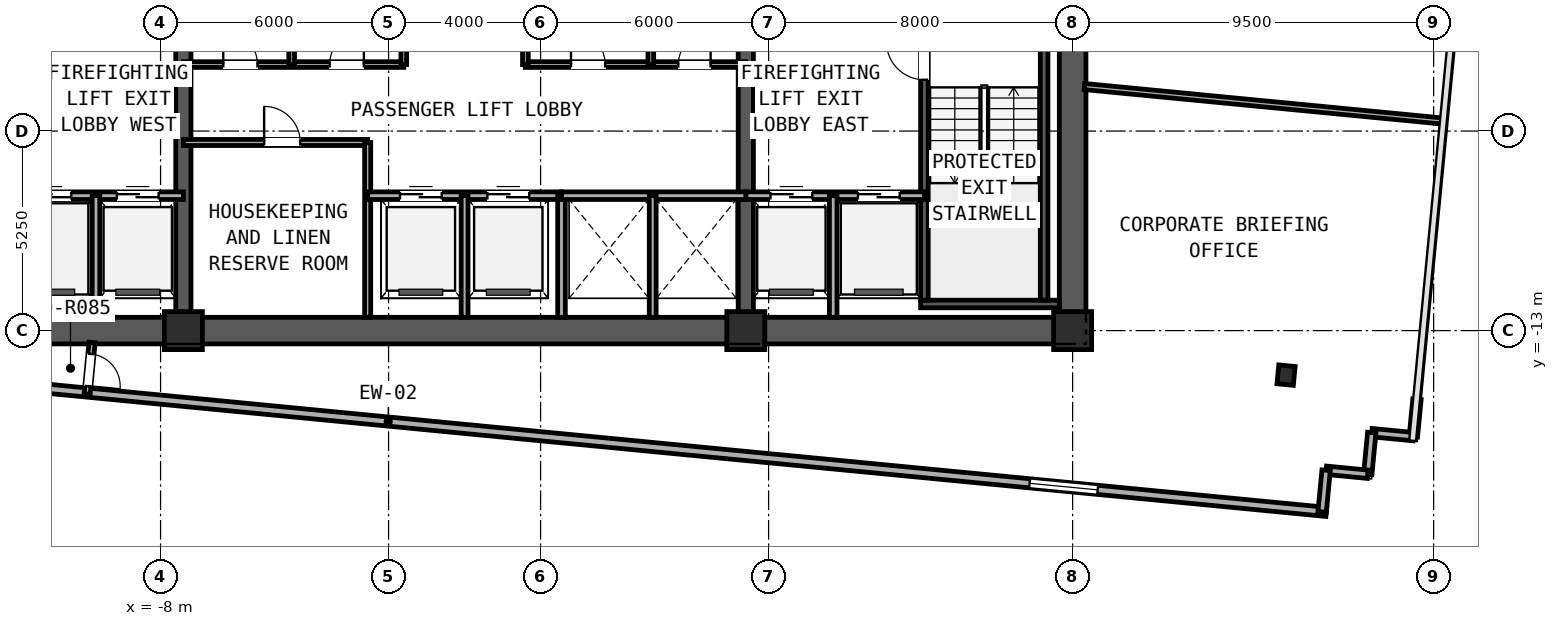
"""IFC4 building model, lengths in metres.
Left out: names, types, materials, properties, quantities, classifications, styles, units other than length and angle.
Written with IfcOpenShell. Run it as: python <this file> out.ifc"""

import sys

from ifc_helpers import new_model, si_unit, direction, frame, frame_2d, origin, origin_2d, place, context, subcontext, project, spatial, rectangle, i_section, extrude, element, fill, save


model = new_model("IFC4")
c1 = context("Model", 3, precision=1e-05, world=origin(), true_north=direction((0.0, 1.0)))
c2 = subcontext(c1, "Body", "Model", "MODEL_VIEW")
j1 = project(units=[si_unit("LENGTHUNIT", "METRE"), si_unit("PLANEANGLEUNIT", "RADIAN")], contexts=[c1])
p1 = place(None, origin())
s1 = spatial("IfcSite", under=j1, at=p1, CompositionType="ELEMENT")
p2 = place(p1, origin())
s2 = spatial("IfcBuilding", under=s1, at=p2, CompositionType="ELEMENT")
p3 = place(p2, frame((0.0, 0.0, 160.05)))
s3 = spatial("IfcBuildingStorey", under=s2, at=p3, CompositionType="ELEMENT", Elevation=160.05)
p4 = place(p3, frame((-16.35, -13.0, 0.0), z_axis=(0.0, 0.0, 1.0), x_axis=(1.0, 0.0, 0.0)))
e1 = element("IfcWall", 1, at=p4, inside=s3, PredefinedType="SHEAR", context=c2, shape_type="SweptSolid", body=[
    extrude(rectangle(XDim=32.7, YDim=0.7, at=frame_2d((16.35, 0.0))), origin(), (0.0, 0.0, 1.0), 2.91),
])
p5 = place(p3, frame((16.0, -12.65, 0.0), z_axis=(0.0, 0.0, 1.0), x_axis=(0.0, 1.0, 0.0)))
e2 = element("IfcWall", 2, at=p5, inside=s3, PredefinedType="SHEAR", context=c2, shape_type="SweptSolid", body=[
    extrude(rectangle(XDim=9.8, YDim=0.7, at=frame_2d((4.9, 0.0))), origin(), (0.0, 0.0, 1.0), 2.91),
])
for number, where, z_axis, x_axis in (
    (3, (-7.4, -12.65, 0.0), (0.0, 0.0, 1.0), (0.0, 1.0, 0.0)),
    (4, (7.4, -12.65, 0.0), (0.0, 0.0, 1.0), (0.0, 1.0, 0.0)),
):
    element("IfcWall", number, at=place(p3, frame(where, z_axis=z_axis, x_axis=x_axis)), inside=s3, PredefinedType="SHEAR", context=c2, shape_type="SweptSolid", body=[
        extrude(rectangle(XDim=9.8, YDim=0.4, at=frame_2d((4.9, 0.0))), origin(), (0.0, 0.0, 1.0), 3.19),
    ])
p6 = place(p3, frame((12.0, -12.3, 0.0), z_axis=(0.0, 0.0, 1.0), x_axis=(1.0, 0.0, 0.0)))
e5 = element("IfcWall", 5, at=p6, inside=s3, PredefinedType="SOLIDWALL", context=c2, shape_type="SweptSolid", body=[
    extrude(rectangle(XDim=3.65, YDim=0.2, at=frame_2d((1.825, 0.0))), origin(), (0.0, 0.0, 1.0), 3.19),
])
p7 = place(p3, frame((12.1, -12.2, 0.0), z_axis=(0.0, 0.0, 1.0), x_axis=(0.0, 1.0, 0.0)))
e6 = element("IfcWall", 6, at=p7, inside=s3, PredefinedType="SOLIDWALL", context=c2, shape_type="SweptSolid", body=[
    extrude(rectangle(XDim=7.0, YDim=0.2, at=frame_2d((3.5, 0.0))), origin(), (0.0, 0.0, 1.0), 3.19),
])
p8 = place(p7, frame((5.8, 0.0, 0.0)))
e7 = element("IfcOpeningElement", 7, at=p8, cuts=e6, PredefinedType="OPENING", context=c2, shape_type="SweptSolid", body=[
    extrude(rectangle(XDim=1.0, YDim=2.1, at=frame_2d((0.5, 1.05))), frame((0.0, 0.11, 0.0), z_axis=(0.0, -1.0, 0.0), x_axis=(1.0, 0.0, 0.0)), (0.0, 0.0, 1.0), 0.22),
])
p9 = place(p3, frame((15.25, -12.2, 0.0), z_axis=(0.0, 0.0, 1.0), x_axis=(0.0, 1.0, 0.0)))
e8 = element("IfcWall", 8, at=p9, inside=s3, PredefinedType="SOLIDWALL", context=c2, shape_type="SweptSolid", body=[
    extrude(rectangle(XDim=7.0, YDim=0.2, at=frame_2d((3.5, 0.0))), origin(), (0.0, 0.0, 1.0), 3.19),
])
for number, where, z_axis, x_axis in (
    (9, (-7.4, -13.0, 0.0), (0.0, 0.0, 1.0), (1.0, 0.0, 0.0)),
    (10, (7.4, -13.0, 0.0), (0.0, 0.0, 1.0), (1.0, 0.0, 0.0)),
    (11, (16.0, -13.0, 0.0), (0.0, 0.0, 1.0), (1.0, 0.0, 0.0)),
):
    element("IfcColumn", number, at=place(p3, frame(where, z_axis=z_axis, x_axis=x_axis)), inside=s3, PredefinedType="COLUMN", context=c2, shape_type="SweptSolid", body=[
        extrude(rectangle(XDim=1.0, YDim=1.0, at=origin_2d()), origin(), (0.0, 0.0, 1.0), 3.45),
    ])
p10 = place(p3, frame((21.616, -14.172, 0.0), z_axis=(0.0, 0.0, 1.0), x_axis=(0.995396198367, -0.09584575252, 0.0)))
e12 = element("IfcColumn", 12, at=p10, inside=s3, PredefinedType="COLUMN", context=c2, shape_type="SweptSolid", body=[
    extrude(i_section(OverallWidth=0.432, OverallDepth=0.498, WebThickness=0.056, FlangeThickness=0.089, FilletRadius=0.031, at=origin_2d()), origin(), (0.0, 0.0, 1.0), 3.45),
])
p11 = place(p3, frame((-26.695, -13.016, 0.0), z_axis=(0.0, 0.0, 1.0), x_axis=(0.995396268366, -0.095845025554, 0.0)))
e13 = element("IfcWall", 13, at=p11, inside=s3, PredefinedType="STANDARD", context=c2, shape_type="SweptSolid", body=[
    extrude(rectangle(XDim=49.6, YDim=0.24, at=frame_2d((24.8, 0.0))), origin(), (0.0, 0.0, 1.0), 3.19),
])
p12 = place(p11, frame((6.044, 0.0, 0.7)))
e14 = element("IfcOpeningElement", 14, at=p12, cuts=e13, PredefinedType="OPENING", context=c2, shape_type="SweptSolid", body=[
    extrude(rectangle(XDim=1.8, YDim=1.5, at=frame_2d((0.9, 0.75))), frame((0.0, 0.13, 0.0), z_axis=(0.0, -1.0, 0.0), x_axis=(1.0, 0.0, 0.0)), (0.0, 0.0, 1.0), 0.26),
])
p13 = place(p11, frame((41.756, 0.0, 0.7)))
e15 = element("IfcOpeningElement", 15, at=p13, cuts=e13, PredefinedType="OPENING", context=c2, shape_type="SweptSolid", body=[
    extrude(rectangle(XDim=1.8, YDim=1.5, at=frame_2d((0.9, 0.75))), frame((0.0, 0.13, 0.0), z_axis=(0.0, -1.0, 0.0), x_axis=(1.0, 0.0, 0.0)), (0.0, 0.0, 1.0), 0.26),
])
p14 = place(p3, frame((25.062, -14.805, 0.0), z_axis=(0.0, 0.0, 1.0), x_axis=(-0.095914428506, -0.995389583231, 0.0)))
e16 = element("IfcWall", 16, at=p14, inside=s3, PredefinedType="STANDARD", context=c2, shape_type="SweptSolid", body=[
    extrude(rectangle(XDim=0.99, YDim=0.22, at=frame_2d((0.495, 0.0))), origin(), (0.0, 0.0, 1.0), 3.19),
])
for number, where, z_axis, x_axis in (
    (17, (24.967, -15.791, 0.0), (0.0, 0.0, 1.0), (-0.995, 0.096, 0.0)),
    (18, (23.872, -15.685, 0.0), (0.0, 0.0, 1.0), (-0.096, -0.995, 0.0)),
    (19, (23.766, -16.78, 0.0), (0.0, 0.0, 1.0), (-0.995, 0.096, 0.0)),
    (20, (22.671, -16.675, 0.0), (0.0, 0.0, 1.0), (-0.096, -0.995, 0.0)),
):
    element("IfcWall", number, at=place(p3, frame(where, z_axis=z_axis, x_axis=x_axis)), inside=s3, PredefinedType="STANDARD", context=c2, shape_type="SweptSolid", body=[
        extrude(rectangle(XDim=1.1, YDim=0.22, at=frame_2d((0.55, 0.0))), origin(), (0.0, 0.0, 1.0), 3.19),
    ])
p15 = place(p3, frame((-12.1, -9.45, 0.0), z_axis=(0.0, 0.0, 1.0), x_axis=(1.0, 0.0, 0.0)))
e21 = element("IfcWall", 21, at=p15, inside=s3, PredefinedType="PARTITIONING", context=c2, shape_type="SweptSolid", body=[
    extrude(rectangle(XDim=4.7, YDim=0.2, at=frame_2d((2.35, 0.0))), origin(), (0.0, 0.0, 1.0), 3.19),
])
p16 = place(p15, frame((0.65, 0.0, 0.0)))
e22 = element("IfcOpeningElement", 22, at=p16, cuts=e21, PredefinedType="OPENING", context=c2, shape_type="SweptSolid", body=[
    extrude(rectangle(XDim=1.1, YDim=2.2, at=frame_2d((0.55, 1.1))), frame((0.0, 0.11, 0.0), z_axis=(0.0, -1.0, 0.0), x_axis=(1.0, 0.0, 0.0)), (0.0, 0.0, 1.0), 0.22),
])
p17 = place(p15, frame((2.95, 0.0, 0.0)))
e23 = element("IfcOpeningElement", 23, at=p17, cuts=e21, PredefinedType="OPENING", context=c2, shape_type="SweptSolid", body=[
    extrude(rectangle(XDim=1.1, YDim=2.2, at=frame_2d((0.55, 1.1))), frame((0.0, 0.11, 0.0), z_axis=(0.0, -1.0, 0.0), x_axis=(1.0, 0.0, 0.0)), (0.0, 0.0, 1.0), 0.22),
])
p18 = place(p3, frame((-9.7, -12.65, 0.0), z_axis=(0.0, 0.0, 1.0), x_axis=(0.0, 1.0, 0.0)))
e24 = element("IfcWall", 24, at=p18, inside=s3, PredefinedType="PARTITIONING", context=c2, shape_type="SweptSolid", body=[
    extrude(rectangle(XDim=3.2, YDim=0.2, at=frame_2d((1.6, 0.0))), origin(), (0.0, 0.0, 1.0), 2.225),
])
p19 = place(p3, frame((7.4, -9.45, 0.0), z_axis=(0.0, 0.0, 1.0), x_axis=(1.0, 0.0, 0.0)))
e25 = element("IfcWall", 25, at=p19, inside=s3, PredefinedType="PARTITIONING", context=c2, shape_type="SweptSolid", body=[
    extrude(rectangle(XDim=4.7, YDim=0.2, at=frame_2d((2.35, 0.0))), origin(), (0.0, 0.0, 1.0), 3.19),
])
p20 = place(p19, frame((2.95, 0.0, 0.0)))
e26 = element("IfcOpeningElement", 26, at=p20, cuts=e25, PredefinedType="OPENING", context=c2, shape_type="SweptSolid", body=[
    extrude(rectangle(XDim=1.1, YDim=2.2, at=frame_2d((0.55, 1.1))), frame((0.0, 0.11, 0.0), z_axis=(0.0, -1.0, 0.0), x_axis=(1.0, 0.0, 0.0)), (0.0, 0.0, 1.0), 0.22),
])
p21 = place(p19, frame((0.65, 0.0, 0.0)))
e27 = element("IfcOpeningElement", 27, at=p21, cuts=e25, PredefinedType="OPENING", context=c2, shape_type="SweptSolid", body=[
    extrude(rectangle(XDim=1.1, YDim=2.2, at=frame_2d((0.55, 1.1))), frame((0.0, 0.11, 0.0), z_axis=(0.0, -1.0, 0.0), x_axis=(1.0, 0.0, 0.0)), (0.0, 0.0, 1.0), 0.22),
])
p22 = place(p3, frame((9.7, -12.65, 0.0), z_axis=(0.0, 0.0, 1.0), x_axis=(0.0, 1.0, 0.0)))
e28 = element("IfcWall", 28, at=p22, inside=s3, PredefinedType="PARTITIONING", context=c2, shape_type="SweptSolid", body=[
    extrude(rectangle(XDim=3.2, YDim=0.2, at=frame_2d((1.6, 0.0))), origin(), (0.0, 0.0, 1.0), 2.225),
])
p23 = place(p3, frame((-7.4, -8.05, 0.0), z_axis=(0.0, 0.0, 1.0), x_axis=(1.0, 0.0, 0.0)))
e29 = element("IfcWall", 29, at=p23, inside=s3, PredefinedType="PARTITIONING", context=c2, shape_type="SweptSolid", body=[
    extrude(rectangle(XDim=4.85, YDim=0.16, at=frame_2d((2.425, 0.0))), origin(), (0.0, 0.0, 1.0), 3.19),
])
p24 = place(p23, frame((2.125, 0.0, 0.0)))
e30 = element("IfcOpeningElement", 30, at=p24, cuts=e29, PredefinedType="OPENING", context=c2, shape_type="SweptSolid", body=[
    extrude(rectangle(XDim=0.95, YDim=2.15, at=frame_2d((0.475, 1.075))), frame((0.0, 0.09, 0.0), z_axis=(0.0, -1.0, 0.0), x_axis=(1.0, 0.0, 0.0)), (0.0, 0.0, 1.0), 0.18),
])
p25 = place(p3, frame((-2.55, -12.65, 0.0), z_axis=(0.0, 0.0, 1.0), x_axis=(0.0, 1.0, 0.0)))
e31 = element("IfcWall", 31, at=p25, inside=s3, PredefinedType="PARTITIONING", context=c2, shape_type="SweptSolid", body=[
    extrude(rectangle(XDim=4.6, YDim=0.16, at=frame_2d((2.3, 0.0))), origin(), (0.0, 0.0, 1.0), 2.225),
])
p26 = place(p3, frame((-2.55, -9.45, 0.0), z_axis=(0.0, 0.0, 1.0), x_axis=(1.0, 0.0, 0.0)))
e32 = element("IfcWall", 32, at=p26, inside=s3, PredefinedType="PARTITIONING", context=c2, shape_type="SweptSolid", body=[
    extrude(rectangle(XDim=5.1, YDim=0.2, at=frame_2d((2.55, 0.0))), origin(), (0.0, 0.0, 1.0), 3.19),
])
p27 = place(p26, frame((0.85, 0.0, 0.0)))
e33 = element("IfcOpeningElement", 33, at=p27, cuts=e32, PredefinedType="OPENING", context=c2, shape_type="SweptSolid", body=[
    extrude(rectangle(XDim=1.1, YDim=2.2, at=frame_2d((0.55, 1.1))), frame((0.0, 0.11, 0.0), z_axis=(0.0, -1.0, 0.0), x_axis=(1.0, 0.0, 0.0)), (0.0, 0.0, 1.0), 0.22),
])
p28 = place(p26, frame((3.15, 0.0, 0.0)))
e34 = element("IfcOpeningElement", 34, at=p28, cuts=e32, PredefinedType="OPENING", context=c2, shape_type="SweptSolid", body=[
    extrude(rectangle(XDim=1.1, YDim=2.2, at=frame_2d((0.55, 1.1))), frame((0.0, 0.11, 0.0), z_axis=(0.0, -1.0, 0.0), x_axis=(1.0, 0.0, 0.0)), (0.0, 0.0, 1.0), 0.22),
])
p29 = place(p3, frame((0.0, -12.65, 0.0), z_axis=(0.0, 0.0, 1.0), x_axis=(0.0, 1.0, 0.0)))
e35 = element("IfcWall", 35, at=p29, inside=s3, PredefinedType="PARTITIONING", context=c2, shape_type="SweptSolid", body=[
    extrude(rectangle(XDim=3.2, YDim=0.18, at=frame_2d((1.6, 0.0))), origin(), (0.0, 0.0, 1.0), 2.225),
])
p30 = place(p3, frame((2.55, -12.65, 0.0), z_axis=(0.0, 0.0, 1.0), x_axis=(0.0, 1.0, 0.0)))
e36 = element("IfcWall", 36, at=p30, inside=s3, PredefinedType="PARTITIONING", context=c2, shape_type="SweptSolid", body=[
    extrude(rectangle(XDim=3.2, YDim=0.2, at=frame_2d((1.6, 0.0))), origin(), (0.0, 0.0, 1.0), 2.225),
])
p31 = place(p3, frame((2.55, -9.45, 0.0), z_axis=(0.0, 0.0, 1.0), x_axis=(1.0, 0.0, 0.0)))
e37 = element("IfcWall", 37, at=p31, inside=s3, PredefinedType="PARTITIONING", context=c2, shape_type="SweptSolid", body=[
    extrude(rectangle(XDim=4.85, YDim=0.2, at=frame_2d((2.425, 0.0))), origin(), (0.0, 0.0, 1.0), 3.19),
])
p32 = place(p3, frame((4.95, -12.65, 0.0), z_axis=(0.0, 0.0, 1.0), x_axis=(0.0, 1.0, 0.0)))
e38 = element("IfcWall", 38, at=p32, inside=s3, PredefinedType="PARTITIONING", context=c2, shape_type="SweptSolid", body=[
    extrude(rectangle(XDim=3.2, YDim=0.18, at=frame_2d((1.6, 0.0))), origin(), (0.0, 0.0, 1.0), 2.225),
])
p33 = place(p3, frame((-7.4, -6.0, 0.0), z_axis=(0.0, 0.0, 1.0), x_axis=(1.0, 0.0, 0.0)))
e39 = element("IfcWall", 39, at=p33, inside=s3, PredefinedType="PARTITIONING", context=c2, shape_type="SweptSolid", body=[
    extrude(rectangle(XDim=5.8, YDim=0.15, at=frame_2d((2.9, 0.0))), origin(), (0.0, 0.0, 1.0), 3.19),
])
p34 = place(p33, frame((1.05, 0.0, 0.0)))
e40 = element("IfcOpeningElement", 40, at=p34, cuts=e39, PredefinedType="OPENING", context=c2, shape_type="SweptSolid", body=[
    extrude(rectangle(XDim=0.9, YDim=2.1, at=frame_2d((0.45, 1.05))), frame((0.0, 0.085, 0.0), z_axis=(0.0, -1.0, 0.0), x_axis=(1.0, 0.0, 0.0)), (0.0, 0.0, 1.0), 0.17),
])
p35 = place(p33, frame((3.85, 0.0, 0.0)))
e41 = element("IfcOpeningElement", 41, at=p35, cuts=e39, PredefinedType="OPENING", context=c2, shape_type="SweptSolid", body=[
    extrude(rectangle(XDim=0.9, YDim=2.1, at=frame_2d((0.45, 1.05))), frame((0.0, 0.085, 0.0), z_axis=(0.0, -1.0, 0.0), x_axis=(1.0, 0.0, 0.0)), (0.0, 0.0, 1.0), 0.17),
])
p36 = place(p3, frame((-1.6, -6.0, 0.0), z_axis=(0.0, 0.0, 1.0), x_axis=(0.0, 1.0, 0.0)))
e42 = element("IfcWall", 42, at=p36, inside=s3, PredefinedType="PARTITIONING", context=c2, shape_type="SweptSolid", body=[
    extrude(rectangle(XDim=3.5, YDim=0.15, at=frame_2d((1.75, 0.0))), origin(), (0.0, 0.0, 1.0), 2.225),
])
p37 = place(p3, frame((1.6, -6.0, 0.0), z_axis=(0.0, 0.0, 1.0), x_axis=(1.0, 0.0, 0.0)))
e43 = element("IfcWall", 43, at=p37, inside=s3, PredefinedType="PARTITIONING", context=c2, shape_type="SweptSolid", body=[
    extrude(rectangle(XDim=5.8, YDim=0.15, at=frame_2d((2.9, 0.0))), origin(), (0.0, 0.0, 1.0), 3.19),
])
p38 = place(p37, frame((1.2, 0.0, 0.0)))
e44 = element("IfcOpeningElement", 44, at=p38, cuts=e43, PredefinedType="OPENING", context=c2, shape_type="SweptSolid", body=[
    extrude(rectangle(XDim=0.9, YDim=2.1, at=frame_2d((0.45, 1.05))), frame((0.0, 0.085, 0.0), z_axis=(0.0, -1.0, 0.0), x_axis=(1.0, 0.0, 0.0)), (0.0, 0.0, 1.0), 0.17),
])
p39 = place(p37, frame((4.025, 0.0, 0.0)))
e45 = element("IfcOpeningElement", 45, at=p39, cuts=e43, PredefinedType="OPENING", context=c2, shape_type="SweptSolid", body=[
    extrude(rectangle(XDim=0.85, YDim=2.05, at=frame_2d((0.425, 1.025))), frame((0.0, 0.085, 0.0), z_axis=(0.0, -1.0, 0.0), x_axis=(1.0, 0.0, 0.0)), (0.0, 0.0, 1.0), 0.17),
])
for number, where, z_axis, x_axis in (
    (46, (1.6, -6.0, 0.0), (0.0, 0.0, 1.0), (0.0, 1.0, 0.0)),
    (47, (-4.55, -6.0, 0.0), (0.0, 0.0, 1.0), (0.0, 1.0, 0.0)),
    (48, (4.9, -6.0, 0.0), (0.0, 0.0, 1.0), (0.0, 1.0, 0.0)),
):
    element("IfcWall", number, at=place(p3, frame(where, z_axis=z_axis, x_axis=x_axis)), inside=s3, PredefinedType="PARTITIONING", context=c2, shape_type="SweptSolid", body=[
        extrude(rectangle(XDim=3.5, YDim=0.15, at=frame_2d((1.75, 0.0))), origin(), (0.0, 0.0, 1.0), 2.225),
    ])
p40 = place(p3, frame((-9.802, -13.31, 0.0), z_axis=(0.0, 0.0, 1.0), x_axis=(-0.095930256126, -0.995388057975, 0.0)))
e49 = element("IfcWall", 49, at=p40, inside=s3, PredefinedType="PARTITIONING", context=c2, shape_type="SweptSolid", body=[
    extrude(rectangle(XDim=1.367, YDim=0.16, at=frame_2d((0.683, 0.0))), origin(), (0.0, 0.0, 1.0), 2.225),
])
p41 = place(p40, frame((0.306, 0.0, 0.0)))
e50 = element("IfcOpeningElement", 50, at=p41, cuts=e49, PredefinedType="OPENING", context=c2, shape_type="SweptSolid", body=[
    extrude(rectangle(XDim=0.85, YDim=2.05, at=frame_2d((0.425, 1.025))), frame((0.0, 0.09, 0.0), z_axis=(0.0, -1.0, 0.0), x_axis=(1.0, 0.0, 0.0)), (0.0, 0.0, 1.0), 0.18),
])
p42 = place(p3, frame((25.796, -7.492, 0.0), z_axis=(0.0, 0.0, 1.0), x_axis=(-0.995396487733, 0.095842747294, 0.0)))
e51 = element("IfcWall", 51, at=p42, inside=s3, PredefinedType="PARTITIONING", context=c2, shape_type="SweptSolid", body=[
    extrude(rectangle(XDim=9.53, YDim=0.16, at=frame_2d((4.765, 0.0))), origin(), (0.0, 0.0, 1.0), 2.225),
])
p43 = place(p13, origin())
e52 = element("IfcWindow", 52, at=p43, inside=s3, PartitioningType="SINGLE_PANEL", PredefinedType="WINDOW", context=c2, shape_type="SweptSolid", body=[
    extrude(rectangle(XDim=1.8, YDim=1.5, at=frame_2d((0.9, 0.75))), frame((0.0, 0.03, 0.0), z_axis=(0.0, -1.0, 0.0), x_axis=(1.0, 0.0, 0.0)), (0.0, 0.0, 1.0), 0.06),
])
fill(e15, e52)
p44 = place(p8, origin())
e53 = element("IfcDoor", 53, at=p44, inside=s3, OperationType="SINGLE_SWING_RIGHT", PredefinedType="DOOR", context=c2, shape_type="SweptSolid", body=[
    extrude(rectangle(XDim=1.0, YDim=2.1, at=frame_2d((0.5, 1.05))), frame((0.0, 0.025, 0.0), z_axis=(0.0, -1.0, 0.0), x_axis=(1.0, 0.0, 0.0)), (0.0, 0.0, 1.0), 0.05),
])
fill(e7, e53)
p45 = place(p16, origin())
e54 = element("IfcDoor", 54, at=p45, inside=s3, OperationType="SLIDING_TO_LEFT", PredefinedType="DOOR", context=c2, shape_type="SweptSolid", body=[
    extrude(rectangle(XDim=1.1, YDim=2.2, at=frame_2d((0.55, 1.1))), frame((0.0, 0.025, 0.0), z_axis=(0.0, -1.0, 0.0), x_axis=(1.0, 0.0, 0.0)), (0.0, 0.0, 1.0), 0.05),
])
fill(e22, e54)
p46 = place(p17, origin())
e55 = element("IfcDoor", 55, at=p46, inside=s3, OperationType="SLIDING_TO_RIGHT", PredefinedType="DOOR", context=c2, shape_type="SweptSolid", body=[
    extrude(rectangle(XDim=1.1, YDim=2.2, at=frame_2d((0.55, 1.1))), frame((0.0, 0.025, 0.0), z_axis=(0.0, -1.0, 0.0), x_axis=(1.0, 0.0, 0.0)), (0.0, 0.0, 1.0), 0.05),
])
fill(e23, e55)
p47 = place(p20, origin())
e56 = element("IfcDoor", 56, at=p47, inside=s3, OperationType="SLIDING_TO_LEFT", PredefinedType="DOOR", context=c2, shape_type="SweptSolid", body=[
    extrude(rectangle(XDim=1.1, YDim=2.2, at=frame_2d((0.55, 1.1))), frame((0.0, 0.025, 0.0), z_axis=(0.0, -1.0, 0.0), x_axis=(1.0, 0.0, 0.0)), (0.0, 0.0, 1.0), 0.05),
])
fill(e26, e56)
p48 = place(p21, origin())
e57 = element("IfcDoor", 57, at=p48, inside=s3, OperationType="SLIDING_TO_RIGHT", PredefinedType="DOOR", context=c2, shape_type="SweptSolid", body=[
    extrude(rectangle(XDim=1.1, YDim=2.2, at=frame_2d((0.55, 1.1))), frame((0.0, 0.025, 0.0), z_axis=(0.0, -1.0, 0.0), x_axis=(1.0, 0.0, 0.0)), (0.0, 0.0, 1.0), 0.05),
])
fill(e27, e57)
p49 = place(p24, origin())
e58 = element("IfcDoor", 58, at=p49, inside=s3, OperationType="SINGLE_SWING_LEFT", PredefinedType="DOOR", context=c2, shape_type="SweptSolid", body=[
    extrude(rectangle(XDim=0.95, YDim=2.15, at=frame_2d((0.475, 1.075))), frame((0.0, 0.025, 0.0), z_axis=(0.0, -1.0, 0.0), x_axis=(1.0, 0.0, 0.0)), (0.0, 0.0, 1.0), 0.05),
])
fill(e30, e58)
p50 = place(p27, origin())
e59 = element("IfcDoor", 59, at=p50, inside=s3, OperationType="SLIDING_TO_RIGHT", PredefinedType="DOOR", context=c2, shape_type="SweptSolid", body=[
    extrude(rectangle(XDim=1.1, YDim=2.2, at=frame_2d((0.55, 1.1))), frame((0.0, 0.025, 0.0), z_axis=(0.0, -1.0, 0.0), x_axis=(1.0, 0.0, 0.0)), (0.0, 0.0, 1.0), 0.05),
])
fill(e33, e59)
p51 = place(p28, origin())
e60 = element("IfcDoor", 60, at=p51, inside=s3, OperationType="SLIDING_TO_RIGHT", PredefinedType="DOOR", context=c2, shape_type="SweptSolid", body=[
    extrude(rectangle(XDim=1.1, YDim=2.2, at=frame_2d((0.55, 1.1))), frame((0.0, 0.025, 0.0), z_axis=(0.0, -1.0, 0.0), x_axis=(1.0, 0.0, 0.0)), (0.0, 0.0, 1.0), 0.05),
])
fill(e34, e60)
p52 = place(p34, frame((0.9, 0.0, 0.0), z_axis=(0.0, 0.0, 1.0), x_axis=(-1.0, 0.0, 0.0)))
e61 = element("IfcDoor", 61, at=p52, inside=s3, OperationType="SINGLE_SWING_LEFT", PredefinedType="DOOR", context=c2, shape_type="SweptSolid", body=[
    extrude(rectangle(XDim=0.9, YDim=2.1, at=frame_2d((0.45, 1.05))), frame((0.0, 0.025, 0.0), z_axis=(0.0, -1.0, 0.0), x_axis=(1.0, 0.0, 0.0)), (0.0, 0.0, 1.0), 0.05),
])
fill(e40, e61)
p53 = place(p35, frame((0.9, 0.0, 0.0), z_axis=(0.0, 0.0, 1.0), x_axis=(-1.0, 0.0, 0.0)))
e62 = element("IfcDoor", 62, at=p53, inside=s3, OperationType="SINGLE_SWING_RIGHT", PredefinedType="DOOR", context=c2, shape_type="SweptSolid", body=[
    extrude(rectangle(XDim=0.9, YDim=2.1, at=frame_2d((0.45, 1.05))), frame((0.0, 0.025, 0.0), z_axis=(0.0, -1.0, 0.0), x_axis=(1.0, 0.0, 0.0)), (0.0, 0.0, 1.0), 0.05),
])
fill(e41, e62)
p54 = place(p38, frame((0.9, 0.0, 0.0), z_axis=(0.0, 0.0, 1.0), x_axis=(-1.0, 0.0, 0.0)))
e63 = element("IfcDoor", 63, at=p54, inside=s3, OperationType="SINGLE_SWING_LEFT", PredefinedType="DOOR", context=c2, shape_type="SweptSolid", body=[
    extrude(rectangle(XDim=0.9, YDim=2.1, at=frame_2d((0.45, 1.05))), frame((0.0, 0.025, 0.0), z_axis=(0.0, -1.0, 0.0), x_axis=(1.0, 0.0, 0.0)), (0.0, 0.0, 1.0), 0.05),
])
fill(e44, e63)
p55 = place(p39, frame((0.85, 0.0, 0.0), z_axis=(0.0, 0.0, 1.0), x_axis=(-1.0, 0.0, 0.0)))
e64 = element("IfcDoor", 64, at=p55, inside=s3, OperationType="SINGLE_SWING_RIGHT", PredefinedType="DOOR", context=c2, shape_type="SweptSolid", body=[
    extrude(rectangle(XDim=0.85, YDim=2.05, at=frame_2d((0.425, 1.025))), frame((0.0, 0.025, 0.0), z_axis=(0.0, -1.0, 0.0), x_axis=(1.0, 0.0, 0.0)), (0.0, 0.0, 1.0), 0.05),
])
fill(e45, e64)
p56 = place(p41, frame((0.85, 0.0, 0.0), z_axis=(0.0, 0.0, 1.0), x_axis=(-1.0, 0.0, 0.0)))
e65 = element("IfcDoor", 65, at=p56, inside=s3, OperationType="SINGLE_SWING_RIGHT", PredefinedType="DOOR", context=c2, shape_type="SweptSolid", body=[
    extrude(rectangle(XDim=0.85, YDim=2.05, at=frame_2d((0.425, 1.025))), frame((0.0, 0.025, 0.0), z_axis=(0.0, -1.0, 0.0), x_axis=(1.0, 0.0, 0.0)), (0.0, 0.0, 1.0), 0.05),
])
fill(e50, e65)
save(model, sys.argv[1])
